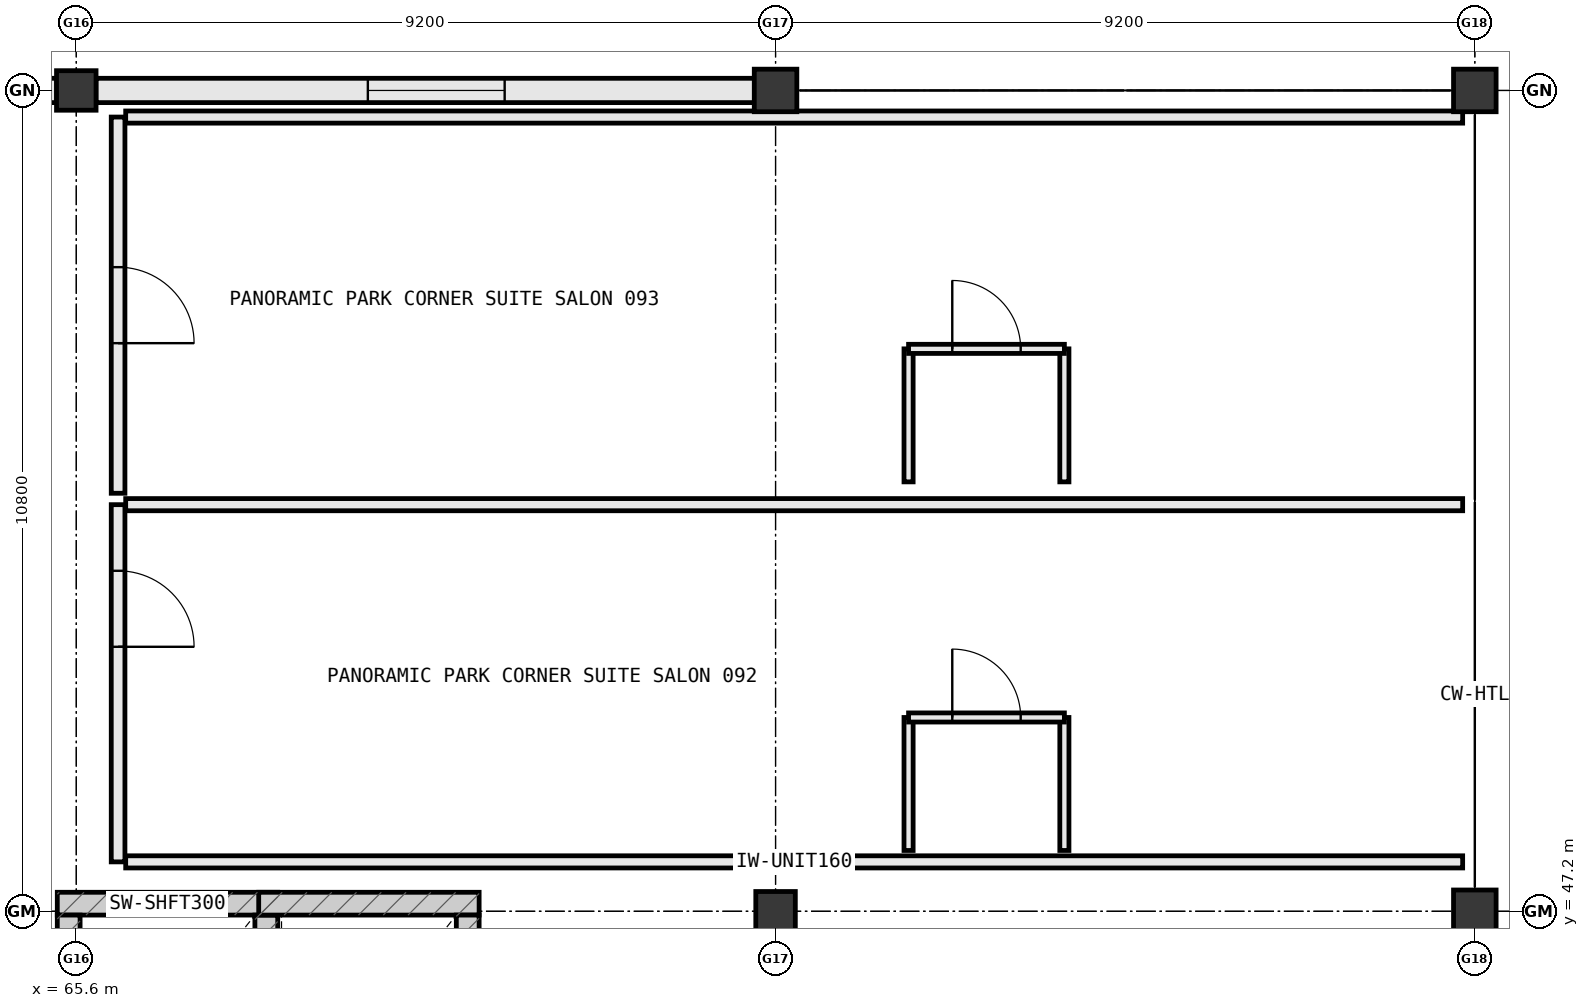
"""IFC4 building model, lengths in metres.
Left out: names, types, materials, properties, quantities, classifications, styles, units other than length and angle.
Written with IfcOpenShell. Run it as: python <this file> out.ifc"""

import sys

from ifc_helpers import new_model, si_unit, direction, frame, frame_2d, origin, origin_2d, place, context, subcontext, project, spatial, rectangle, extrude, element, fill, save


model = new_model("IFC4")
c1 = context("Model", 3, precision=1e-05, world=origin(), true_north=direction((0.0, 1.0)))
c2 = subcontext(c1, "Body", "Model", "MODEL_VIEW")
j1 = project(units=[si_unit("LENGTHUNIT", "METRE"), si_unit("PLANEANGLEUNIT", "RADIAN")], contexts=[c1])
p1 = place(None, origin())
s1 = spatial("IfcSite", under=j1, at=p1, CompositionType="ELEMENT")
p2 = place(p1, origin())
s2 = spatial("IfcBuilding", under=s1, at=p2, CompositionType="ELEMENT")
p3 = place(p2, frame((0.0, 0.0, 16.2)))
s3 = spatial("IfcBuildingStorey", under=s2, at=p3, CompositionType="ELEMENT", Elevation=16.2)
p4 = place(p3, frame((74.8, 47.2, 0.0), z_axis=(0.0, 0.0, 1.0), x_axis=(1.0, 0.0, 0.0)))
e1 = element("IfcColumn", 1, at=p4, inside=s3, PredefinedType="COLUMN", context=c2, shape_type="SweptSolid", body=[
    extrude(rectangle(XDim=0.52, YDim=0.52, at=origin_2d()), origin(), (0.0, 0.0, 1.0), 3.8),
])
for number, where, z_axis, x_axis in (
    (2, (74.8, 58.0, 0.0), (0.0, 0.0, 1.0), (1.0, 0.0, 0.0)),
    (3, (84.0, 47.2, 0.0), (0.0, 0.0, 1.0), (1.0, 0.0, 0.0)),
    (4, (84.0, 58.0, 0.0), (0.0, 0.0, 1.0), (1.0, 0.0, 0.0)),
):
    element("IfcColumn", number, at=place(p3, frame(where, z_axis=z_axis, x_axis=x_axis)), inside=s3, PredefinedType="COLUMN", context=c2, shape_type="SweptSolid", body=[
        extrude(rectangle(XDim=0.56, YDim=0.56, at=origin_2d()), origin(), (0.0, 0.0, 1.0), 3.8),
    ])
p5 = place(p3, frame((65.6, 58.0, 0.0), z_axis=(0.0, 0.0, 1.0), x_axis=(1.0, 0.0, 0.0)))
e5 = element("IfcColumn", 5, at=p5, inside=s3, PredefinedType="COLUMN", context=c2, shape_type="SweptSolid", body=[
    extrude(rectangle(XDim=0.52, YDim=0.52, at=origin_2d()), origin(), (0.0, 0.0, 1.0), 3.8),
])
p6 = place(p3, frame((74.522, 58.0, 0.0), z_axis=(0.0, 0.0, 1.0), x_axis=(-1.0, 0.0, 0.0)))
e6 = element("IfcWall", 6, at=p6, inside=s3, PredefinedType="STANDARD", context=c2, shape_type="SweptSolid", body=[
    extrude(rectangle(XDim=8.664, YDim=0.32, at=frame_2d((4.332, 0.0))), origin(), (0.0, 0.0, 1.0), 2.875),
])
p7 = place(p6, frame((3.286, 0.0, 0.85)))
e7 = element("IfcOpeningElement", 7, at=p7, cuts=e6, PredefinedType="OPENING", context=c2, shape_type="SweptSolid", body=[
    extrude(rectangle(XDim=1.8, YDim=1.85, at=frame_2d((0.9, 0.925))), frame((0.0, 0.172, 0.0), z_axis=(0.0, -1.0, 0.0), x_axis=(1.0, 0.0, 0.0)), (0.0, 0.0, 1.0), 0.344),
])
p8 = place(p3, frame((65.342, 58.0, 0.0), z_axis=(0.0, 0.0, 1.0), x_axis=(-1.0, 0.0, 0.0)))
e8 = element("IfcWall", 8, at=p8, inside=s3, PredefinedType="STANDARD", context=c2, shape_type="SweptSolid", body=[
    extrude(rectangle(XDim=4.264, YDim=0.32, at=frame_2d((2.132, 0.0))), origin(), (0.0, 0.0, 1.0), 2.875),
])
p9 = place(p8, frame((1.157, 0.0, 0.85)))
e9 = element("IfcOpeningElement", 9, at=p9, cuts=e8, PredefinedType="OPENING", context=c2, shape_type="SweptSolid", body=[
    extrude(rectangle(XDim=1.95, YDim=1.9, at=frame_2d((0.975, 0.95))), frame((0.0, 0.172, 0.0), z_axis=(0.0, -1.0, 0.0), x_axis=(1.0, 0.0, 0.0)), (0.0, 0.0, 1.0), 0.344),
])
for number, where, z_axis, x_axis in (
    (10, (68.25, 47.3, 0.0), (0.0, 0.0, 1.0), (-1.0, 0.0, 0.0)),
    (11, (68.1, 44.25, 0.0), (0.0, 0.0, 1.0), (0.0, 1.0, 0.0)),
    (12, (65.5, 47.15, 0.0), (0.0, 0.0, 1.0), (0.0, -1.0, 0.0)),
    (13, (70.9, 47.3, 0.0), (0.0, 0.0, 1.0), (-1.0, 0.0, 0.0)),
    (14, (70.75, 44.25, 0.0), (0.0, 0.0, 1.0), (0.0, 1.0, 0.0)),
):
    element("IfcWall", number, at=place(p3, frame(where, z_axis=z_axis, x_axis=x_axis)), inside=s3, PredefinedType="SHEAR", context=c2, shape_type="SweptSolid", body=[
        extrude(rectangle(XDim=2.9, YDim=0.3, at=frame_2d((1.45, 0.0))), origin(), (0.0, 0.0, 1.0), 3.8),
    ])
p10 = place(p3, frame((66.15, 52.55, 0.0), z_axis=(0.0, 0.0, 1.0), x_axis=(0.0, -1.0, 0.0)))
e15 = element("IfcWall", 15, at=p10, inside=s3, PredefinedType="PARTITIONING", context=c2, shape_type="SweptSolid", body=[
    extrude(rectangle(XDim=4.7, YDim=0.18, at=frame_2d((2.35, 0.0))), origin(), (0.0, 0.0, 1.0), 3.56),
])
p11 = place(p10, frame((0.87, 0.0, 0.0)))
e16 = element("IfcOpeningElement", 16, at=p11, cuts=e15, PredefinedType="OPENING", context=c2, shape_type="SweptSolid", body=[
    extrude(rectangle(XDim=1.0, YDim=2.2, at=frame_2d((0.5, 1.1))), frame((0.0, 0.102, 0.0), z_axis=(0.0, -1.0, 0.0), x_axis=(1.0, 0.0, 0.0)), (0.0, 0.0, 1.0), 0.204),
])
for number, where, z_axis, x_axis in (
    (17, (66.25, 47.85, 0.0), (0.0, 0.0, 1.0), (1.0, 0.0, 0.0)),
    (18, (66.25, 52.55, 0.0), (0.0, 0.0, 1.0), (1.0, 0.0, 0.0)),
):
    element("IfcWall", number, at=place(p3, frame(where, z_axis=z_axis, x_axis=x_axis)), inside=s3, PredefinedType="PARTITIONING", context=c2, shape_type="SweptSolid", body=[
        extrude(rectangle(XDim=17.59, YDim=0.16, at=frame_2d((8.795, 0.0))), origin(), (0.0, 0.0, 1.0), 3.56),
    ])
for number, where, z_axis, x_axis in (
    (19, (76.55, 48.0, 0.0), (0.0, 0.0, 1.0), (0.0, 1.0, 0.0)),
    (20, (78.6, 48.0, 0.0), (0.0, 0.0, 1.0), (0.0, 1.0, 0.0)),
):
    element("IfcWall", number, at=place(p3, frame(where, z_axis=z_axis, x_axis=x_axis)), inside=s3, PredefinedType="PARTITIONING", context=c2, shape_type="SweptSolid", body=[
        extrude(rectangle(XDim=1.75, YDim=0.12, at=frame_2d((0.875, 0.0))), origin(), (0.0, 0.0, 1.0), 3.56),
    ])
p12 = place(p3, frame((76.55, 49.75, 0.0), z_axis=(0.0, 0.0, 1.0), x_axis=(1.0, 0.0, 0.0)))
e21 = element("IfcWall", 21, at=p12, inside=s3, PredefinedType="PARTITIONING", context=c2, shape_type="SweptSolid", body=[
    extrude(rectangle(XDim=2.05, YDim=0.12, at=frame_2d((1.025, 0.0))), origin(), (0.0, 0.0, 1.0), 3.56),
])
p13 = place(p12, frame((0.575, 0.0, 0.0)))
e22 = element("IfcOpeningElement", 22, at=p13, cuts=e21, PredefinedType="OPENING", context=c2, shape_type="SweptSolid", body=[
    extrude(rectangle(XDim=0.9, YDim=2.15, at=frame_2d((0.45, 1.075))), frame((0.0, 0.072, 0.0), z_axis=(0.0, -1.0, 0.0), x_axis=(1.0, 0.0, 0.0)), (0.0, 0.0, 1.0), 0.144),
])
p14 = place(p3, frame((66.15, 57.65, 0.0), z_axis=(0.0, 0.0, 1.0), x_axis=(0.0, -1.0, 0.0)))
e23 = element("IfcWall", 23, at=p14, inside=s3, PredefinedType="PARTITIONING", context=c2, shape_type="SweptSolid", body=[
    extrude(rectangle(XDim=4.95, YDim=0.18, at=frame_2d((2.475, 0.0))), origin(), (0.0, 0.0, 1.0), 3.56),
])
p15 = place(p14, frame((1.975, 0.0, 0.0)))
e24 = element("IfcOpeningElement", 24, at=p15, cuts=e23, PredefinedType="OPENING", context=c2, shape_type="SweptSolid", body=[
    extrude(rectangle(XDim=1.0, YDim=2.2, at=frame_2d((0.5, 1.1))), frame((0.0, 0.102, 0.0), z_axis=(0.0, -1.0, 0.0), x_axis=(1.0, 0.0, 0.0)), (0.0, 0.0, 1.0), 0.204),
])
p16 = place(p3, frame((66.25, 57.65, 0.0), z_axis=(0.0, 0.0, 1.0), x_axis=(1.0, 0.0, 0.0)))
e25 = element("IfcWall", 25, at=p16, inside=s3, PredefinedType="PARTITIONING", context=c2, shape_type="SweptSolid", body=[
    extrude(rectangle(XDim=17.59, YDim=0.16, at=frame_2d((8.795, 0.0))), origin(), (0.0, 0.0, 1.0), 2.875),
])
for number, where, z_axis, x_axis in (
    (26, (76.55, 52.85, 0.0), (0.0, 0.0, 1.0), (0.0, 1.0, 0.0)),
    (27, (78.6, 52.85, 0.0), (0.0, 0.0, 1.0), (0.0, 1.0, 0.0)),
):
    element("IfcWall", number, at=place(p3, frame(where, z_axis=z_axis, x_axis=x_axis)), inside=s3, PredefinedType="PARTITIONING", context=c2, shape_type="SweptSolid", body=[
        extrude(rectangle(XDim=1.75, YDim=0.12, at=frame_2d((0.875, 0.0))), origin(), (0.0, 0.0, 1.0), 3.56),
    ])
p17 = place(p3, frame((76.55, 54.6, 0.0), z_axis=(0.0, 0.0, 1.0), x_axis=(1.0, 0.0, 0.0)))
e28 = element("IfcWall", 28, at=p17, inside=s3, PredefinedType="PARTITIONING", context=c2, shape_type="SweptSolid", body=[
    extrude(rectangle(XDim=2.05, YDim=0.12, at=frame_2d((1.025, 0.0))), origin(), (0.0, 0.0, 1.0), 3.56),
])
p18 = place(p17, frame((0.575, 0.0, 0.0)))
e29 = element("IfcOpeningElement", 29, at=p18, cuts=e28, PredefinedType="OPENING", context=c2, shape_type="SweptSolid", body=[
    extrude(rectangle(XDim=0.9, YDim=2.15, at=frame_2d((0.45, 1.075))), frame((0.0, 0.072, 0.0), z_axis=(0.0, -1.0, 0.0), x_axis=(1.0, 0.0, 0.0)), (0.0, 0.0, 1.0), 0.144),
])
p19 = place(p7, origin())
e30 = element("IfcWindow", 30, at=p19, inside=s3, PartitioningType="SINGLE_PANEL", PredefinedType="WINDOW", context=c2, shape_type="SweptSolid", body=[
    extrude(rectangle(XDim=1.8, YDim=1.85, at=frame_2d((0.9, 0.925))), frame((0.0, 0.03, 0.0), z_axis=(0.0, -1.0, 0.0), x_axis=(1.0, 0.0, 0.0)), (0.0, 0.0, 1.0), 0.06),
])
fill(e7, e30)
p20 = place(p11, origin())
e31 = element("IfcDoor", 31, at=p20, inside=s3, OperationType="SINGLE_SWING_RIGHT", PredefinedType="DOOR", context=c2, shape_type="SweptSolid", body=[
    extrude(rectangle(XDim=1.0, YDim=2.2, at=frame_2d((0.5, 1.1))), frame((0.0, 0.025, 0.0), z_axis=(0.0, -1.0, 0.0), x_axis=(1.0, 0.0, 0.0)), (0.0, 0.0, 1.0), 0.05),
])
fill(e16, e31)
p21 = place(p13, origin())
e32 = element("IfcDoor", 32, at=p21, inside=s3, OperationType="SINGLE_SWING_LEFT", PredefinedType="DOOR", context=c2, shape_type="SweptSolid", body=[
    extrude(rectangle(XDim=0.9, YDim=2.15, at=frame_2d((0.45, 1.075))), frame((0.0, 0.025, 0.0), z_axis=(0.0, -1.0, 0.0), x_axis=(1.0, 0.0, 0.0)), (0.0, 0.0, 1.0), 0.05),
])
fill(e22, e32)
p22 = place(p15, origin())
e33 = element("IfcDoor", 33, at=p22, inside=s3, OperationType="SINGLE_SWING_RIGHT", PredefinedType="DOOR", context=c2, shape_type="SweptSolid", body=[
    extrude(rectangle(XDim=1.0, YDim=2.2, at=frame_2d((0.5, 1.1))), frame((0.0, 0.025, 0.0), z_axis=(0.0, -1.0, 0.0), x_axis=(1.0, 0.0, 0.0)), (0.0, 0.0, 1.0), 0.05),
])
fill(e24, e33)
p23 = place(p18, origin())
e34 = element("IfcDoor", 34, at=p23, inside=s3, OperationType="SINGLE_SWING_LEFT", PredefinedType="DOOR", context=c2, shape_type="SweptSolid", body=[
    extrude(rectangle(XDim=0.9, YDim=2.15, at=frame_2d((0.45, 1.075))), frame((0.0, 0.025, 0.0), z_axis=(0.0, -1.0, 0.0), x_axis=(1.0, 0.0, 0.0)), (0.0, 0.0, 1.0), 0.05),
])
fill(e29, e34)
save(model, sys.argv[1])
